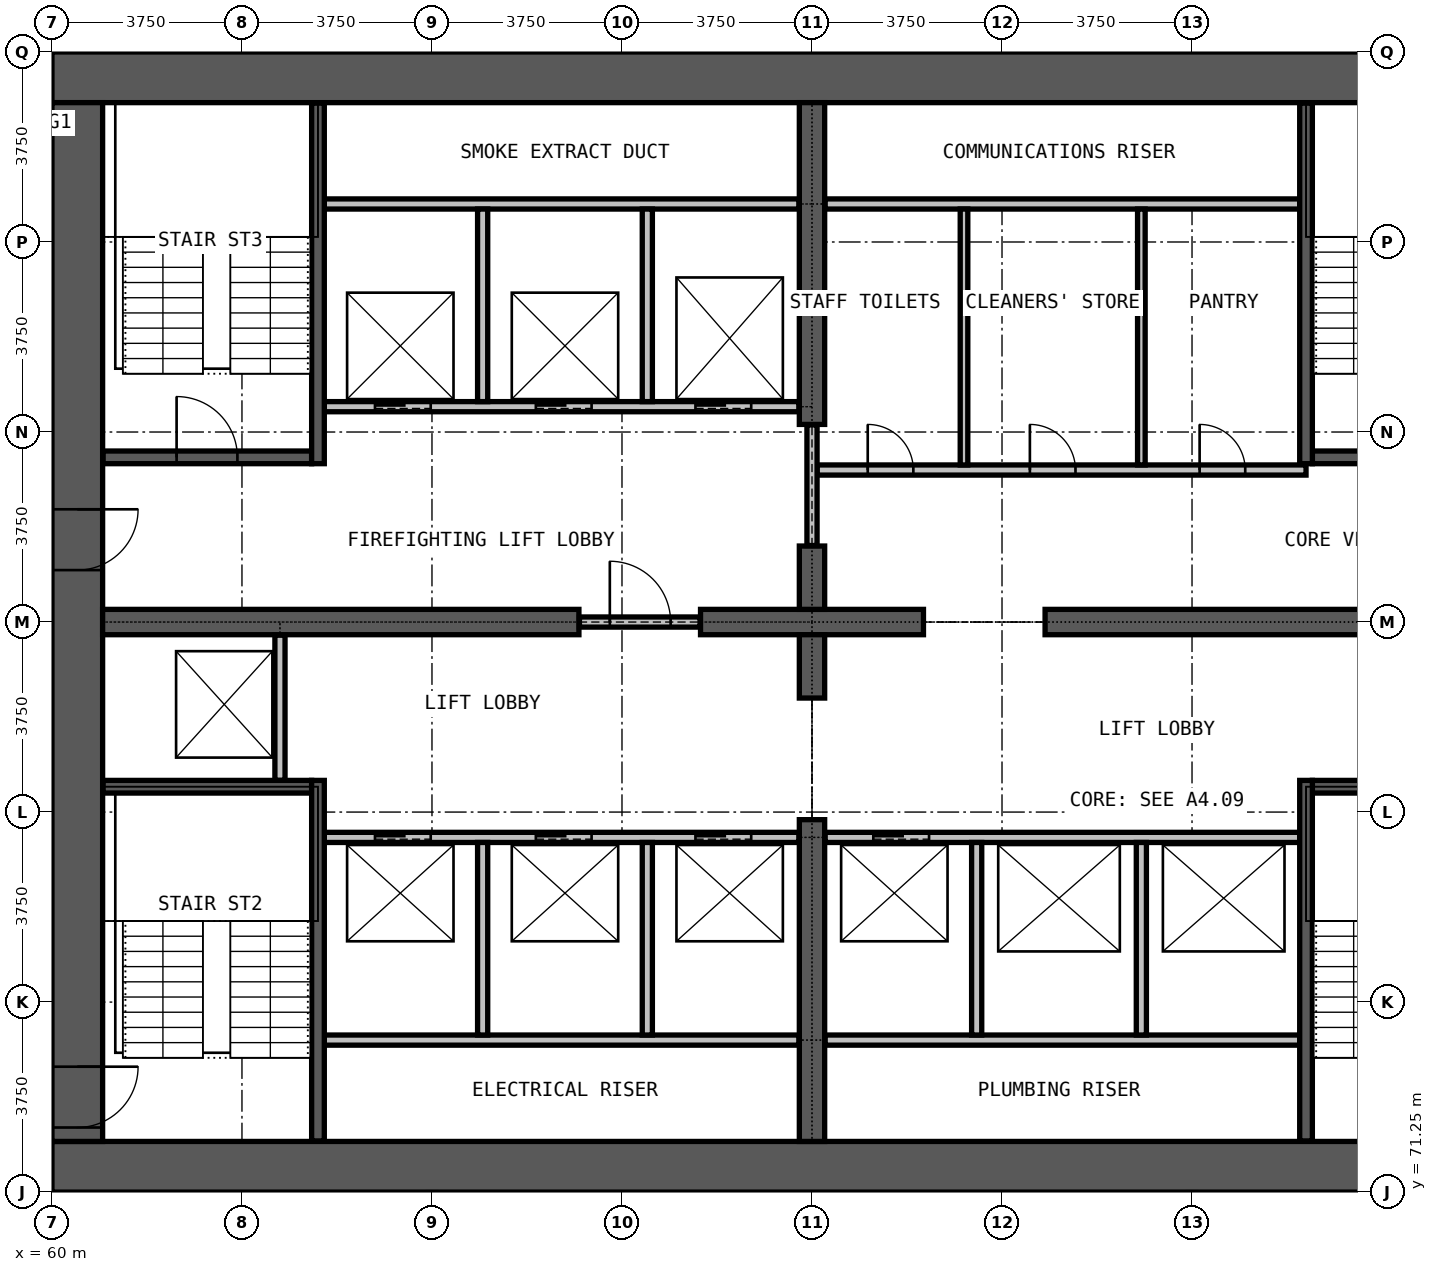
"""IFC4 building model, lengths in metres.
Left out: names, types, materials, properties, quantities, classifications, styles, units other than length and angle.
Written with IfcOpenShell. Run it as: python <this file> out.ifc"""

import sys

from ifc_helpers import new_model, si_unit, direction, frame, frame_2d, origin, place, context, subcontext, project, spatial, rectangle, extrude, element, fill, save


model = new_model("IFC4")
c1 = context("Model", 3, precision=1e-05, world=origin(), true_north=direction((0.0, 1.0)))
c2 = subcontext(c1, "Body", "Model", "MODEL_VIEW")
j1 = project(units=[si_unit("LENGTHUNIT", "METRE"), si_unit("PLANEANGLEUNIT", "RADIAN")], contexts=[c1])
p1 = place(None, origin())
s1 = spatial("IfcSite", under=j1, at=p1, CompositionType="ELEMENT")
p2 = place(p1, origin())
s2 = spatial("IfcBuilding", under=s1, at=p2, CompositionType="ELEMENT")
p3 = place(p2, frame((0.0, 0.0, 69.2)))
s3 = spatial("IfcBuildingStorey", under=s2, at=p3, CompositionType="ELEMENT", Elevation=69.2)
for number, where, z_axis, x_axis in (
    (1, (60.0, 71.75, 0.0), (0.0, 0.0, 1.0), (1.0, 0.0, 0.0)),
    (2, (90.0, 93.25, 0.0), (0.0, 0.0, 1.0), (-1.0, 0.0, 0.0)),
):
    element("IfcWall", number, at=place(p3, frame(where, z_axis=z_axis, x_axis=x_axis)), inside=s3, PredefinedType="SHEAR", context=c2, shape_type="SweptSolid", body=[
        extrude(rectangle(XDim=30.0, YDim=1.0, at=frame_2d((15.0, 0.0))), origin(), (0.0, 0.0, 1.0), 3.3),
    ])
p4 = place(p3, frame((60.5, 92.75, 0.0), z_axis=(0.0, 0.0, 1.0), x_axis=(0.0, -1.0, 0.0)))
e3 = element("IfcWall", 3, at=p4, inside=s3, PredefinedType="SHEAR", context=c2, shape_type="SweptSolid", body=[
    extrude(rectangle(XDim=20.5, YDim=1.0, at=frame_2d((10.25, 0.0))), origin(), (0.0, 0.0, 1.0), 3.3),
])
p5 = place(p4, frame((19.025, 0.0, 0.0)))
e4 = element("IfcOpeningElement", 4, at=p5, cuts=e3, PredefinedType="OPENING", context=c2, shape_type="SweptSolid", body=[
    extrude(rectangle(XDim=1.2, YDim=2.2, at=frame_2d((0.6, 1.1))), frame((0.0, 0.51, 0.0), z_axis=(0.0, -1.0, 0.0), x_axis=(1.0, 0.0, 0.0)), (0.0, 0.0, 1.0), 1.02),
])
p6 = place(p4, frame((8.025, 0.0, 0.0)))
e5 = element("IfcOpeningElement", 5, at=p6, cuts=e3, PredefinedType="OPENING", context=c2, shape_type="SweptSolid", body=[
    extrude(rectangle(XDim=1.2, YDim=2.2, at=frame_2d((0.6, 1.1))), frame((0.0, 0.51, 0.0), z_axis=(0.0, -1.0, 0.0), x_axis=(1.0, 0.0, 0.0)), (0.0, 0.0, 1.0), 1.02),
])
p7 = place(p3, frame((61.0, 82.5, 0.0), z_axis=(0.0, 0.0, 1.0), x_axis=(1.0, 0.0, 0.0)))
e6 = element("IfcWall", 6, at=p7, inside=s3, PredefinedType="SHEAR", context=c2, shape_type="SweptSolid", body=[
    extrude(rectangle(XDim=9.4, YDim=0.5, at=frame_2d((4.7, 0.0))), origin(), (0.0, 0.0, 1.0), 3.3),
])
p8 = place(p3, frame((72.8, 82.5, 0.0), z_axis=(0.0, 0.0, 1.0), x_axis=(1.0, 0.0, 0.0)))
e7 = element("IfcWall", 7, at=p8, inside=s3, PredefinedType="SHEAR", context=c2, shape_type="SweptSolid", body=[
    extrude(rectangle(XDim=4.4, YDim=0.5, at=frame_2d((2.2, 0.0))), origin(), (0.0, 0.0, 1.0), 3.3),
])
p9 = place(p3, frame((79.6, 82.5, 0.0), z_axis=(0.0, 0.0, 1.0), x_axis=(1.0, 0.0, 0.0)))
e8 = element("IfcWall", 8, at=p9, inside=s3, PredefinedType="SHEAR", context=c2, shape_type="SweptSolid", body=[
    extrude(rectangle(XDim=9.4, YDim=0.5, at=frame_2d((4.7, 0.0))), origin(), (0.0, 0.0, 1.0), 3.3),
])
p10 = place(p3, frame((75.0, 72.25, 0.0), z_axis=(0.0, 0.0, 1.0), x_axis=(0.0, 1.0, 0.0)))
e9 = element("IfcWall", 9, at=p10, inside=s3, PredefinedType="SHEAR", context=c2, shape_type="SweptSolid", body=[
    extrude(rectangle(XDim=6.35, YDim=0.5, at=frame_2d((3.175, 0.0))), origin(), (0.0, 0.0, 1.0), 3.3),
])
for number, where, z_axis, x_axis in (
    (10, (75.0, 81.0, 0.0), (0.0, 0.0, 1.0), (0.0, 1.0, 0.0)),
    (11, (75.0, 82.75, 0.0), (0.0, 0.0, 1.0), (0.0, 1.0, 0.0)),
):
    element("IfcWall", number, at=place(p3, frame(where, z_axis=z_axis, x_axis=x_axis)), inside=s3, PredefinedType="SHEAR", context=c2, shape_type="SweptSolid", body=[
        extrude(rectangle(XDim=1.25, YDim=0.5, at=frame_2d((0.625, 0.0))), origin(), (0.0, 0.0, 1.0), 3.3),
    ])
p11 = place(p3, frame((75.0, 86.4, 0.0), z_axis=(0.0, 0.0, 1.0), x_axis=(0.0, 1.0, 0.0)))
e12 = element("IfcWall", 12, at=p11, inside=s3, PredefinedType="SHEAR", context=c2, shape_type="SweptSolid", body=[
    extrude(rectangle(XDim=6.35, YDim=0.5, at=frame_2d((3.175, 0.0))), origin(), (0.0, 0.0, 1.0), 3.3),
])
p12 = place(p3, frame((70.41, 82.5, 0.0), z_axis=(0.0, 0.0, 1.0), x_axis=(1.0, 0.0, 0.0)))
e13 = element("IfcWall", 13, at=p12, inside=s3, PredefinedType="PARTITIONING", context=c2, shape_type="SweptSolid", body=[
    extrude(rectangle(XDim=2.38, YDim=0.2, at=frame_2d((1.19, 0.0))), origin(), (0.0, 0.0, 1.0), 2.4),
])
p13 = place(p12, frame((0.6, 0.0, 0.0)))
e14 = element("IfcOpeningElement", 14, at=p13, cuts=e13, PredefinedType="OPENING", context=c2, shape_type="SweptSolid", body=[
    extrude(rectangle(XDim=1.2, YDim=2.2, at=frame_2d((0.6, 1.1))), frame((0.0, 0.11, 0.0), z_axis=(0.0, -1.0, 0.0), x_axis=(1.0, 0.0, 0.0)), (0.0, 0.0, 1.0), 0.22),
])
p14 = place(p3, frame((75.1, 85.5, 0.0), z_axis=(0.0, 0.0, 1.0), x_axis=(1.0, 0.0, 0.0)))
e15 = element("IfcWall", 15, at=p14, inside=s3, PredefinedType="PARTITIONING", context=c2, shape_type="SweptSolid", body=[
    extrude(rectangle(XDim=9.65, YDim=0.2, at=frame_2d((4.825, 0.0))), origin(), (0.0, 0.0, 1.0), 3.0),
])
p15 = place(p14, frame((1.0, 0.0, 0.0)))
e16 = element("IfcOpeningElement", 16, at=p15, cuts=e15, PredefinedType="OPENING", context=c2, shape_type="SweptSolid", body=[
    extrude(rectangle(XDim=0.9, YDim=2.2, at=frame_2d((0.45, 1.1))), frame((0.0, 0.11, 0.0), z_axis=(0.0, -1.0, 0.0), x_axis=(1.0, 0.0, 0.0)), (0.0, 0.0, 1.0), 0.22),
])
p16 = place(p14, frame((4.2, 0.0, 0.0)))
e17 = element("IfcOpeningElement", 17, at=p16, cuts=e15, PredefinedType="OPENING", context=c2, shape_type="SweptSolid", body=[
    extrude(rectangle(XDim=0.9, YDim=2.2, at=frame_2d((0.45, 1.1))), frame((0.0, 0.11, 0.0), z_axis=(0.0, -1.0, 0.0), x_axis=(1.0, 0.0, 0.0)), (0.0, 0.0, 1.0), 0.22),
])
p17 = place(p14, frame((7.55, 0.0, 0.0)))
e18 = element("IfcOpeningElement", 18, at=p17, cuts=e15, PredefinedType="OPENING", context=c2, shape_type="SweptSolid", body=[
    extrude(rectangle(XDim=0.9, YDim=2.2, at=frame_2d((0.45, 1.1))), frame((0.0, 0.11, 0.0), z_axis=(0.0, -1.0, 0.0), x_axis=(1.0, 0.0, 0.0)), (0.0, 0.0, 1.0), 0.22),
])
p18 = place(p3, frame((75.26, 90.75, 0.0), z_axis=(0.0, 0.0, 1.0), x_axis=(1.0, 0.0, 0.0)))
e19 = element("IfcWall", 19, at=p18, inside=s3, PredefinedType="PARTITIONING", context=c2, shape_type="SweptSolid", body=[
    extrude(rectangle(XDim=9.365, YDim=0.2, at=frame_2d((4.683, 0.0))), origin(), (0.0, 0.0, 1.0), 3.0),
])
p19 = place(p3, frame((75.0, 84.01, 0.0), z_axis=(0.0, 0.0, 1.0), x_axis=(0.0, 1.0, 0.0)))
e20 = element("IfcWall", 20, at=p19, inside=s3, PredefinedType="PARTITIONING", context=c2, shape_type="SweptSolid", body=[
    extrude(rectangle(XDim=2.38, YDim=0.2, at=frame_2d((1.19, 0.0))), origin(), (0.0, 0.0, 1.0), 2.4),
])
for number, where, z_axis, x_axis in (
    (21, (78.0, 85.6, 0.0), (0.0, 0.0, 1.0), (0.0, 1.0, 0.0)),
    (22, (81.5, 85.6, 0.0), (0.0, 0.0, 1.0), (0.0, 1.0, 0.0)),
):
    element("IfcWall", number, at=place(p3, frame(where, z_axis=z_axis, x_axis=x_axis)), inside=s3, PredefinedType="PARTITIONING", context=c2, shape_type="SweptSolid", body=[
        extrude(rectangle(XDim=5.05, YDim=0.15, at=frame_2d((2.525, 0.0))), origin(), (0.0, 0.0, 1.0), 3.0),
    ])
for number, where, z_axis, x_axis in (
    (23, (65.375, 74.25, 0.0), (0.0, 0.0, 1.0), (1.0, 0.0, 0.0)),
    (24, (75.26, 74.25, 0.0), (0.0, 0.0, 1.0), (1.0, 0.0, 0.0)),
):
    element("IfcWall", number, at=place(p3, frame(where, z_axis=z_axis, x_axis=x_axis)), inside=s3, PredefinedType="PARTITIONING", context=c2, shape_type="SweptSolid", body=[
        extrude(rectangle(XDim=9.365, YDim=0.2, at=frame_2d((4.683, 0.0))), origin(), (0.0, 0.0, 1.0), 3.0),
    ])
p20 = place(p3, frame((65.375, 78.25, 0.0), z_axis=(0.0, 0.0, 1.0), x_axis=(1.0, 0.0, 0.0)))
e25 = element("IfcWall", 25, at=p20, inside=s3, PredefinedType="PARTITIONING", context=c2, shape_type="SweptSolid", body=[
    extrude(rectangle(XDim=9.365, YDim=0.2, at=frame_2d((4.683, 0.0))), origin(), (0.0, 0.0, 1.0), 3.0),
])
p21 = place(p20, frame((1.0, 0.0, 0.0)))
e26 = element("IfcOpeningElement", 26, at=p21, cuts=e25, PredefinedType="OPENING", context=c2, shape_type="SweptSolid", body=[
    extrude(rectangle(XDim=1.1, YDim=2.2, at=frame_2d((0.55, 1.1))), frame((0.0, 0.11, 0.0), z_axis=(0.0, -1.0, 0.0), x_axis=(1.0, 0.0, 0.0)), (0.0, 0.0, 1.0), 0.22),
])
p22 = place(p20, frame((4.175, 0.0, 0.0)))
e27 = element("IfcOpeningElement", 27, at=p22, cuts=e25, PredefinedType="OPENING", context=c2, shape_type="SweptSolid", body=[
    extrude(rectangle(XDim=1.1, YDim=2.2, at=frame_2d((0.55, 1.1))), frame((0.0, 0.11, 0.0), z_axis=(0.0, -1.0, 0.0), x_axis=(1.0, 0.0, 0.0)), (0.0, 0.0, 1.0), 0.22),
])
p23 = place(p20, frame((7.325, 0.0, 0.0)))
e28 = element("IfcOpeningElement", 28, at=p23, cuts=e25, PredefinedType="OPENING", context=c2, shape_type="SweptSolid", body=[
    extrude(rectangle(XDim=1.1, YDim=2.2, at=frame_2d((0.55, 1.1))), frame((0.0, 0.11, 0.0), z_axis=(0.0, -1.0, 0.0), x_axis=(1.0, 0.0, 0.0)), (0.0, 0.0, 1.0), 0.22),
])
p24 = place(p3, frame((75.26, 78.25, 0.0), z_axis=(0.0, 0.0, 1.0), x_axis=(1.0, 0.0, 0.0)))
e29 = element("IfcWall", 29, at=p24, inside=s3, PredefinedType="PARTITIONING", context=c2, shape_type="SweptSolid", body=[
    extrude(rectangle(XDim=9.365, YDim=0.2, at=frame_2d((4.683, 0.0))), origin(), (0.0, 0.0, 1.0), 3.0),
])
p25 = place(p24, frame((0.95, 0.0, 0.0)))
e30 = element("IfcOpeningElement", 30, at=p25, cuts=e29, PredefinedType="OPENING", context=c2, shape_type="SweptSolid", body=[
    extrude(rectangle(XDim=1.1, YDim=2.2, at=frame_2d((0.55, 1.1))), frame((0.0, 0.11, 0.0), z_axis=(0.0, -1.0, 0.0), x_axis=(1.0, 0.0, 0.0)), (0.0, 0.0, 1.0), 0.22),
])
p26 = place(p3, frame((65.375, 86.75, 0.0), z_axis=(0.0, 0.0, 1.0), x_axis=(1.0, 0.0, 0.0)))
e31 = element("IfcWall", 31, at=p26, inside=s3, PredefinedType="PARTITIONING", context=c2, shape_type="SweptSolid", body=[
    extrude(rectangle(XDim=9.365, YDim=0.2, at=frame_2d((4.683, 0.0))), origin(), (0.0, 0.0, 1.0), 3.0),
])
p27 = place(p26, frame((1.0, 0.0, 0.0)))
e32 = element("IfcOpeningElement", 32, at=p27, cuts=e31, PredefinedType="OPENING", context=c2, shape_type="SweptSolid", body=[
    extrude(rectangle(XDim=1.1, YDim=2.2, at=frame_2d((0.55, 1.1))), frame((0.0, 0.11, 0.0), z_axis=(0.0, -1.0, 0.0), x_axis=(1.0, 0.0, 0.0)), (0.0, 0.0, 1.0), 0.22),
])
p28 = place(p26, frame((4.175, 0.0, 0.0)))
e33 = element("IfcOpeningElement", 33, at=p28, cuts=e31, PredefinedType="OPENING", context=c2, shape_type="SweptSolid", body=[
    extrude(rectangle(XDim=1.1, YDim=2.2, at=frame_2d((0.55, 1.1))), frame((0.0, 0.11, 0.0), z_axis=(0.0, -1.0, 0.0), x_axis=(1.0, 0.0, 0.0)), (0.0, 0.0, 1.0), 0.22),
])
p29 = place(p26, frame((7.325, 0.0, 0.0)))
e34 = element("IfcOpeningElement", 34, at=p29, cuts=e31, PredefinedType="OPENING", context=c2, shape_type="SweptSolid", body=[
    extrude(rectangle(XDim=1.1, YDim=2.2, at=frame_2d((0.55, 1.1))), frame((0.0, 0.11, 0.0), z_axis=(0.0, -1.0, 0.0), x_axis=(1.0, 0.0, 0.0)), (0.0, 0.0, 1.0), 0.22),
])
p30 = place(p3, frame((65.375, 90.75, 0.0), z_axis=(0.0, 0.0, 1.0), x_axis=(1.0, 0.0, 0.0)))
e35 = element("IfcWall", 35, at=p30, inside=s3, PredefinedType="PARTITIONING", context=c2, shape_type="SweptSolid", body=[
    extrude(rectangle(XDim=9.365, YDim=0.2, at=frame_2d((4.683, 0.0))), origin(), (0.0, 0.0, 1.0), 3.0),
])
p31 = place(p3, frame((64.5, 79.375, 0.0), z_axis=(0.0, 0.0, 1.0), x_axis=(0.0, 1.0, 0.0)))
e36 = element("IfcWall", 36, at=p31, inside=s3, PredefinedType="PARTITIONING", context=c2, shape_type="SweptSolid", body=[
    extrude(rectangle(XDim=2.865, YDim=0.2, at=frame_2d((1.433, 0.0))), origin(), (0.0, 0.0, 1.0), 3.0),
])
for number, where, z_axis, x_axis in (
    (37, (68.5, 74.35, 0.0), (0.0, 0.0, 1.0), (0.0, 1.0, 0.0)),
    (38, (68.5, 86.85, 0.0), (0.0, 0.0, 1.0), (0.0, 1.0, 0.0)),
    (39, (71.75, 74.35, 0.0), (0.0, 0.0, 1.0), (0.0, 1.0, 0.0)),
    (40, (71.75, 86.85, 0.0), (0.0, 0.0, 1.0), (0.0, 1.0, 0.0)),
    (41, (78.25, 74.35, 0.0), (0.0, 0.0, 1.0), (0.0, 1.0, 0.0)),
    (42, (81.5, 74.35, 0.0), (0.0, 0.0, 1.0), (0.0, 1.0, 0.0)),
):
    element("IfcWall", number, at=place(p3, frame(where, z_axis=z_axis, x_axis=x_axis)), inside=s3, PredefinedType="PARTITIONING", context=c2, shape_type="SweptSolid", body=[
        extrude(rectangle(XDim=3.8, YDim=0.2, at=frame_2d((1.9, 0.0))), origin(), (0.0, 0.0, 1.0), 3.0),
    ])
for number, where, z_axis, x_axis in (
    (43, (61.01, 79.25, 0.0), (0.0, 0.0, 1.0), (1.0, 0.0, 0.0)),
    (44, (84.875, 79.25, 0.0), (0.0, 0.0, 1.0), (1.0, 0.0, 0.0)),
):
    element("IfcWall", number, at=place(p3, frame(where, z_axis=z_axis, x_axis=x_axis)), inside=s3, PredefinedType="PARTITIONING", context=c2, shape_type="SweptSolid", body=[
        extrude(rectangle(XDim=4.115, YDim=0.25, at=frame_2d((2.058, 0.0))), origin(), (0.0, 0.0, 1.0), 3.0),
    ])
p32 = place(p3, frame((61.01, 85.75, 0.0), z_axis=(0.0, 0.0, 1.0), x_axis=(1.0, 0.0, 0.0)))
e45 = element("IfcWall", 45, at=p32, inside=s3, PredefinedType="PARTITIONING", context=c2, shape_type="SweptSolid", body=[
    extrude(rectangle(XDim=4.115, YDim=0.25, at=frame_2d((2.058, 0.0))), origin(), (0.0, 0.0, 1.0), 3.0),
])
p33 = place(p32, frame((1.45, 0.0, 0.0)))
e46 = element("IfcOpeningElement", 46, at=p33, cuts=e45, PredefinedType="OPENING", context=c2, shape_type="SweptSolid", body=[
    extrude(rectangle(XDim=1.2, YDim=2.2, at=frame_2d((0.6, 1.1))), frame((0.0, 0.135, 0.0), z_axis=(0.0, -1.0, 0.0), x_axis=(1.0, 0.0, 0.0)), (0.0, 0.0, 1.0), 0.27),
])
p34 = place(p3, frame((84.875, 85.75, 0.0), z_axis=(0.0, 0.0, 1.0), x_axis=(1.0, 0.0, 0.0)))
e47 = element("IfcWall", 47, at=p34, inside=s3, PredefinedType="PARTITIONING", context=c2, shape_type="SweptSolid", body=[
    extrude(rectangle(XDim=4.115, YDim=0.25, at=frame_2d((2.058, 0.0))), origin(), (0.0, 0.0, 1.0), 3.0),
])
for number, where, z_axis, x_axis in (
    (48, (65.25, 72.26, 0.0), (0.0, 0.0, 1.0), (0.0, 1.0, 0.0)),
    (49, (65.25, 85.625, 0.0), (0.0, 0.0, 1.0), (0.0, 1.0, 0.0)),
    (50, (84.75, 72.26, 0.0), (0.0, 0.0, 1.0), (0.0, 1.0, 0.0)),
    (51, (84.75, 85.625, 0.0), (0.0, 0.0, 1.0), (0.0, 1.0, 0.0)),
):
    element("IfcWall", number, at=place(p3, frame(where, z_axis=z_axis, x_axis=x_axis)), inside=s3, PredefinedType="PARTITIONING", context=c2, shape_type="SweptSolid", body=[
        extrude(rectangle(XDim=7.115, YDim=0.25, at=frame_2d((3.558, 0.0))), origin(), (0.0, 0.0, 1.0), 3.0),
    ])
p35 = place(p21, origin())
e52 = element("IfcDoor", 52, at=p35, inside=s3, OperationType="DOUBLE_DOOR_SLIDING", PredefinedType="DOOR", context=c2, shape_type="SweptSolid", body=[
    extrude(rectangle(XDim=1.1, YDim=2.2, at=frame_2d((0.55, 1.1))), frame((0.0, 0.025, 0.0), z_axis=(0.0, -1.0, 0.0), x_axis=(1.0, 0.0, 0.0)), (0.0, 0.0, 1.0), 0.05),
])
fill(e26, e52)
p36 = place(p22, origin())
e53 = element("IfcDoor", 53, at=p36, inside=s3, OperationType="DOUBLE_DOOR_SLIDING", PredefinedType="DOOR", context=c2, shape_type="SweptSolid", body=[
    extrude(rectangle(XDim=1.1, YDim=2.2, at=frame_2d((0.55, 1.1))), frame((0.0, 0.025, 0.0), z_axis=(0.0, -1.0, 0.0), x_axis=(1.0, 0.0, 0.0)), (0.0, 0.0, 1.0), 0.05),
])
fill(e27, e53)
p37 = place(p23, origin())
e54 = element("IfcDoor", 54, at=p37, inside=s3, OperationType="DOUBLE_DOOR_SLIDING", PredefinedType="DOOR", context=c2, shape_type="SweptSolid", body=[
    extrude(rectangle(XDim=1.1, YDim=2.2, at=frame_2d((0.55, 1.1))), frame((0.0, 0.025, 0.0), z_axis=(0.0, -1.0, 0.0), x_axis=(1.0, 0.0, 0.0)), (0.0, 0.0, 1.0), 0.05),
])
fill(e28, e54)
p38 = place(p25, origin())
e55 = element("IfcDoor", 55, at=p38, inside=s3, OperationType="DOUBLE_DOOR_SLIDING", PredefinedType="DOOR", context=c2, shape_type="SweptSolid", body=[
    extrude(rectangle(XDim=1.1, YDim=2.2, at=frame_2d((0.55, 1.1))), frame((0.0, 0.025, 0.0), z_axis=(0.0, -1.0, 0.0), x_axis=(1.0, 0.0, 0.0)), (0.0, 0.0, 1.0), 0.05),
])
fill(e30, e55)
p39 = place(p27, origin())
e56 = element("IfcDoor", 56, at=p39, inside=s3, OperationType="DOUBLE_DOOR_SLIDING", PredefinedType="DOOR", context=c2, shape_type="SweptSolid", body=[
    extrude(rectangle(XDim=1.1, YDim=2.2, at=frame_2d((0.55, 1.1))), frame((0.0, 0.025, 0.0), z_axis=(0.0, -1.0, 0.0), x_axis=(1.0, 0.0, 0.0)), (0.0, 0.0, 1.0), 0.05),
])
fill(e32, e56)
p40 = place(p28, origin())
e57 = element("IfcDoor", 57, at=p40, inside=s3, OperationType="DOUBLE_DOOR_SLIDING", PredefinedType="DOOR", context=c2, shape_type="SweptSolid", body=[
    extrude(rectangle(XDim=1.1, YDim=2.2, at=frame_2d((0.55, 1.1))), frame((0.0, 0.025, 0.0), z_axis=(0.0, -1.0, 0.0), x_axis=(1.0, 0.0, 0.0)), (0.0, 0.0, 1.0), 0.05),
])
fill(e33, e57)
p41 = place(p29, origin())
e58 = element("IfcDoor", 58, at=p41, inside=s3, OperationType="DOUBLE_DOOR_SLIDING", PredefinedType="DOOR", context=c2, shape_type="SweptSolid", body=[
    extrude(rectangle(XDim=1.1, YDim=2.2, at=frame_2d((0.55, 1.1))), frame((0.0, 0.025, 0.0), z_axis=(0.0, -1.0, 0.0), x_axis=(1.0, 0.0, 0.0)), (0.0, 0.0, 1.0), 0.05),
])
fill(e34, e58)
p42 = place(p13, origin())
e59 = element("IfcDoor", 59, at=p42, inside=s3, OperationType="SINGLE_SWING_RIGHT", PredefinedType="DOOR", context=c2, shape_type="SweptSolid", body=[
    extrude(rectangle(XDim=1.2, YDim=2.2, at=frame_2d((0.6, 1.1))), frame((0.0, 0.025, 0.0), z_axis=(0.0, -1.0, 0.0), x_axis=(1.0, 0.0, 0.0)), (0.0, 0.0, 1.0), 0.05),
])
fill(e14, e59)
p43 = place(p33, origin())
e60 = element("IfcDoor", 60, at=p43, inside=s3, OperationType="SINGLE_SWING_LEFT", PredefinedType="DOOR", context=c2, shape_type="SweptSolid", body=[
    extrude(rectangle(XDim=1.2, YDim=2.2, at=frame_2d((0.6, 1.1))), frame((0.0, 0.025, 0.0), z_axis=(0.0, -1.0, 0.0), x_axis=(1.0, 0.0, 0.0)), (0.0, 0.0, 1.0), 0.05),
])
fill(e46, e60)
p44 = place(p5, origin())
e61 = element("IfcDoor", 61, at=p44, inside=s3, OperationType="SINGLE_SWING_LEFT", PredefinedType="DOOR", context=c2, shape_type="SweptSolid", body=[
    extrude(rectangle(XDim=1.2, YDim=2.2, at=frame_2d((0.6, 1.1))), frame((0.0, 0.025, 0.0), z_axis=(0.0, -1.0, 0.0), x_axis=(1.0, 0.0, 0.0)), (0.0, 0.0, 1.0), 0.05),
])
fill(e4, e61)
p45 = place(p6, origin())
e62 = element("IfcDoor", 62, at=p45, inside=s3, OperationType="SINGLE_SWING_LEFT", PredefinedType="DOOR", context=c2, shape_type="SweptSolid", body=[
    extrude(rectangle(XDim=1.2, YDim=2.2, at=frame_2d((0.6, 1.1))), frame((0.0, 0.025, 0.0), z_axis=(0.0, -1.0, 0.0), x_axis=(1.0, 0.0, 0.0)), (0.0, 0.0, 1.0), 0.05),
])
fill(e5, e62)
p46 = place(p15, origin())
e63 = element("IfcDoor", 63, at=p46, inside=s3, OperationType="SINGLE_SWING_LEFT", PredefinedType="DOOR", context=c2, shape_type="SweptSolid", body=[
    extrude(rectangle(XDim=0.9, YDim=2.2, at=frame_2d((0.45, 1.1))), frame((0.0, 0.025, 0.0), z_axis=(0.0, -1.0, 0.0), x_axis=(1.0, 0.0, 0.0)), (0.0, 0.0, 1.0), 0.05),
])
fill(e16, e63)
p47 = place(p16, origin())
e64 = element("IfcDoor", 64, at=p47, inside=s3, OperationType="SINGLE_SWING_RIGHT", PredefinedType="DOOR", context=c2, shape_type="SweptSolid", body=[
    extrude(rectangle(XDim=0.9, YDim=2.2, at=frame_2d((0.45, 1.1))), frame((0.0, 0.025, 0.0), z_axis=(0.0, -1.0, 0.0), x_axis=(1.0, 0.0, 0.0)), (0.0, 0.0, 1.0), 0.05),
])
fill(e17, e64)
p48 = place(p17, origin())
e65 = element("IfcDoor", 65, at=p48, inside=s3, OperationType="SINGLE_SWING_RIGHT", PredefinedType="DOOR", context=c2, shape_type="SweptSolid", body=[
    extrude(rectangle(XDim=0.9, YDim=2.2, at=frame_2d((0.45, 1.1))), frame((0.0, 0.025, 0.0), z_axis=(0.0, -1.0, 0.0), x_axis=(1.0, 0.0, 0.0)), (0.0, 0.0, 1.0), 0.05),
])
fill(e18, e65)
save(model, sys.argv[1])
